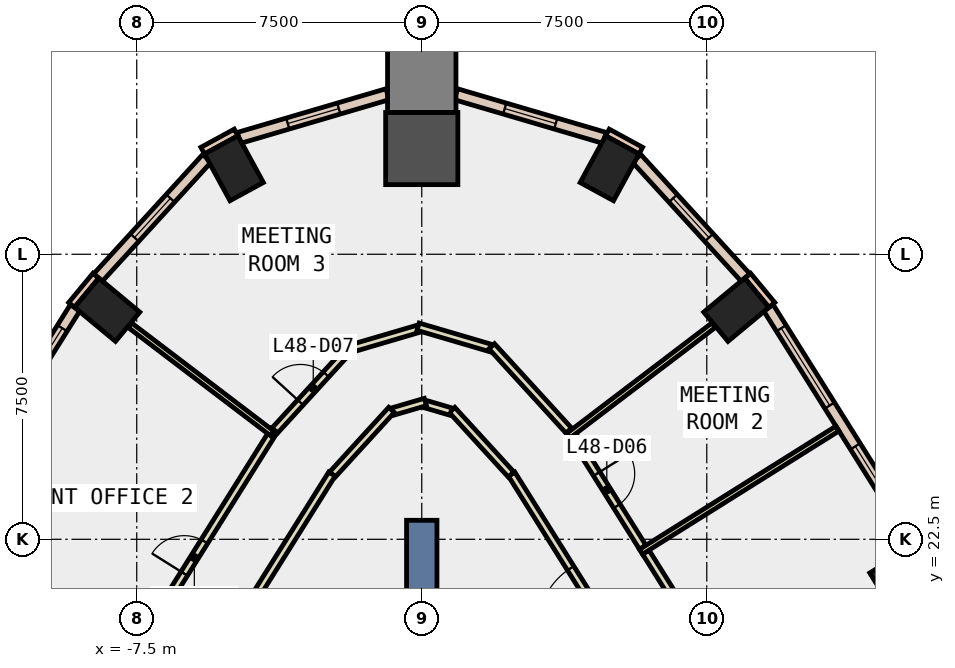
"""IFC4 building model, lengths in metres.
Left out: names, types, materials, properties, quantities, classifications, styles, units other than length and angle.
Written with IfcOpenShell. Run it as: python <this file> out.ifc"""

import sys

from ifc_helpers import new_model, si_unit, direction, frame, frame_2d, origin, origin_2d, place, context, subcontext, project, spatial, rectangle, extrude, element, fill, save


model = new_model("IFC4")
c1 = context("Model", 3, precision=1e-05, world=origin(), true_north=direction((0.0, 1.0)))
c2 = subcontext(c1, "Body", "Model", "MODEL_VIEW")
j1 = project(units=[si_unit("LENGTHUNIT", "METRE"), si_unit("PLANEANGLEUNIT", "RADIAN")], contexts=[c1])
p1 = place(None, origin())
s1 = spatial("IfcSite", under=j1, at=p1, CompositionType="ELEMENT")
p2 = place(p1, origin())
s2 = spatial("IfcBuilding", under=s1, at=p2, CompositionType="ELEMENT")
p3 = place(p2, frame((0.0, 0.0, 215.0)))
s3 = spatial("IfcBuildingStorey", under=s2, at=p3, CompositionType="ELEMENT", Elevation=215.0)
for number, where, z_axis, x_axis in (
    (1, (12.648, 21.557, -0.4), (0.0, 0.0, 1.0), (-0.525, 0.851, 0.0)),
    (2, (8.278, 28.54, -0.4), (0.0, 0.0, 1.0), (-0.639, 0.769, 0.0)),
    (3, (4.942, 32.263, -0.4), (0.0, 0.0, 1.0), (-0.878, 0.478, 0.0)),
):
    element("IfcColumn", number, at=place(p3, frame(where, z_axis=z_axis, x_axis=x_axis)), inside=s3, PredefinedType="COLUMN", context=c2, shape_type="SweptSolid", body=[
        extrude(rectangle(XDim=1.0, YDim=1.4, at=origin_2d()), origin(), (0.0, 0.0, 1.0), 4.2),
    ])
p4 = place(p3, frame((0.0, 32.782, -0.4), z_axis=(0.0, 0.0, 1.0), x_axis=(0.0, 1.0, 0.0)))
e4 = element("IfcColumn", 4, at=p4, inside=s3, PredefinedType="COLUMN", context=c2, shape_type="SweptSolid", body=[
    extrude(rectangle(XDim=1.9, YDim=1.9, at=origin_2d()), origin(), (0.0, 0.0, 1.0), 4.2),
])
for number, where, z_axis, x_axis in (
    (5, (-4.942, 32.263, -0.4), (0.0, 0.0, 1.0), (0.878, 0.478, 0.0)),
    (6, (-8.278, 28.54, -0.4), (0.0, 0.0, 1.0), (0.639, 0.769, 0.0)),
):
    element("IfcColumn", number, at=place(p3, frame(where, z_axis=z_axis, x_axis=x_axis)), inside=s3, PredefinedType="COLUMN", context=c2, shape_type="SweptSolid", body=[
        extrude(rectangle(XDim=1.0, YDim=1.4, at=origin_2d()), origin(), (0.0, 0.0, 1.0), 4.2),
    ])
p5 = place(p3, frame((0.0, 34.632, -0.4), z_axis=(0.0, 0.0, 1.0), x_axis=(0.0, 1.0, 0.0)))
e7 = element("IfcColumn", 7, at=p5, inside=s3, PredefinedType="COLUMN", context=c2, shape_type="SweptSolid", body=[
    extrude(rectangle(XDim=1.8, YDim=1.8, at=origin_2d()), origin(), (0.0, 0.0, 1.0), 4.2),
])
p6 = place(p3, frame((0.0, 14.0, -0.4), z_axis=(0.0, 0.0, 1.0), x_axis=(0.0, 1.0, 0.0)))
e8 = element("IfcWall", 8, at=p6, inside=s3, PredefinedType="SHEAR", context=c2, shape_type="SweptSolid", body=[
    extrude(rectangle(XDim=9.0, YDim=0.8, at=frame_2d((4.5, 0.0))), origin(), (0.0, 0.0, 1.0), 4.2),
])
for number, where, z_axis, x_axis in (
    (9, (5.764, 32.726, 0.0), (0.0, 0.0, 1.0), (-0.878, 0.478, 0.0)),
    (10, (-4.886, 33.204, 0.0), (0.0, 0.0, 1.0), (-0.878, -0.478, 0.0)),
):
    element("IfcWall", number, at=place(p3, frame(where, z_axis=z_axis, x_axis=x_axis)), inside=s3, PredefinedType="STANDARD", context=c2, shape_type="SweptSolid", body=[
        extrude(rectangle(XDim=1.0, YDim=0.2, at=frame_2d((0.5, 0.0))), origin(), (0.0, 0.0, 1.0), 3.8),
    ])
for number, where, z_axis, x_axis in (
    (11, (9.213, 28.666, 0.0), (0.0, 0.0, 1.0), (-0.638, 0.77, 0.0)),
    (12, (-8.575, 29.436, 0.0), (0.0, 0.0, 1.0), (-0.638, -0.77, 0.0)),
):
    element("IfcWall", number, at=place(p3, frame(where, z_axis=z_axis, x_axis=x_axis)), inside=s3, PredefinedType="STANDARD", context=c2, shape_type="SweptSolid", body=[
        extrude(rectangle(XDim=1.0, YDim=0.2, at=frame_2d((0.5, 0.0))), origin(), (0.0, 0.0, 1.0), 3.8),
    ])
p7 = place(p3, frame((13.021, 22.374, 0.0), z_axis=(0.0, 0.0, 1.0), x_axis=(-0.531239262679, 0.847221839773, 0.0)))
e13 = element("IfcWall", 13, at=p7, inside=s3, PredefinedType="STANDARD", context=c2, shape_type="SweptSolid", body=[
    extrude(rectangle(XDim=7.339, YDim=0.3, at=frame_2d((3.67, 0.0))), origin(), (0.0, 0.0, 1.0), 3.8),
])
p8 = place(p7, frame((0.635, 0.0, 0.9)))
e14 = element("IfcOpeningElement", 14, at=p8, cuts=e13, PredefinedType="OPENING", context=c2, shape_type="SweptSolid", body=[
    extrude(rectangle(XDim=2.4, YDim=2.6, at=frame_2d((1.2, 1.3))), frame((0.0, 0.16, 0.0), z_axis=(0.0, -1.0, 0.0), x_axis=(1.0, 0.0, 0.0)), (0.0, 0.0, 1.0), 0.32),
])
p9 = place(p7, frame((4.304, 0.0, 0.9)))
e15 = element("IfcOpeningElement", 15, at=p9, cuts=e13, PredefinedType="OPENING", context=c2, shape_type="SweptSolid", body=[
    extrude(rectangle(XDim=2.4, YDim=2.6, at=frame_2d((1.2, 1.3))), frame((0.0, 0.16, 0.0), z_axis=(0.0, -1.0, 0.0), x_axis=(1.0, 0.0, 0.0)), (0.0, 0.0, 1.0), 0.32),
])
p10 = place(p3, frame((8.518, 29.388, 0.0), z_axis=(0.0, 0.0, 1.0), x_axis=(-0.674487390017, 0.738286367684, 0.0)))
e16 = element("IfcWall", 16, at=p10, inside=s3, PredefinedType="STANDARD", context=c2, shape_type="SweptSolid", body=[
    extrude(rectangle(XDim=4.248, YDim=0.3, at=frame_2d((2.124, 0.0))), origin(), (0.0, 0.0, 1.0), 3.8),
])
p11 = place(p10, frame((1.424, 0.0, 0.9)))
e17 = element("IfcOpeningElement", 17, at=p11, cuts=e16, PredefinedType="OPENING", context=c2, shape_type="SweptSolid", body=[
    extrude(rectangle(XDim=1.4, YDim=2.6, at=frame_2d((0.7, 1.3))), frame((0.0, 0.16, 0.0), z_axis=(0.0, -1.0, 0.0), x_axis=(1.0, 0.0, 0.0)), (0.0, 0.0, 1.0), 0.32),
])
p12 = place(p3, frame((4.81, 33.062, 0.0), z_axis=(0.0, 0.0, 1.0), x_axis=(-0.959458909918, 0.281848541203, 0.0)))
e18 = element("IfcWall", 18, at=p12, inside=s3, PredefinedType="STANDARD", context=c2, shape_type="SweptSolid", body=[
    extrude(rectangle(XDim=4.076, YDim=0.3, at=frame_2d((2.038, 0.0))), origin(), (0.0, 0.0, 1.0), 3.8),
])
p13 = place(p12, frame((1.338, 0.0, 0.9)))
e19 = element("IfcOpeningElement", 19, at=p13, cuts=e18, PredefinedType="OPENING", context=c2, shape_type="SweptSolid", body=[
    extrude(rectangle(XDim=1.4, YDim=2.6, at=frame_2d((0.7, 1.3))), frame((0.0, 0.16, 0.0), z_axis=(0.0, -1.0, 0.0), x_axis=(1.0, 0.0, 0.0)), (0.0, 0.0, 1.0), 0.32),
])
p14 = place(p3, frame((-0.899, 34.211, 0.0), z_axis=(0.0, 0.0, 1.0), x_axis=(-0.959458909918, -0.281848541203, 0.0)))
e20 = element("IfcWall", 20, at=p14, inside=s3, PredefinedType="STANDARD", context=c2, shape_type="SweptSolid", body=[
    extrude(rectangle(XDim=4.076, YDim=0.3, at=frame_2d((2.038, 0.0))), origin(), (0.0, 0.0, 1.0), 3.8),
])
p15 = place(p14, frame((1.338, 0.0, 0.9)))
e21 = element("IfcOpeningElement", 21, at=p15, cuts=e20, PredefinedType="OPENING", context=c2, shape_type="SweptSolid", body=[
    extrude(rectangle(XDim=1.4, YDim=2.6, at=frame_2d((0.7, 1.3))), frame((0.0, 0.16, 0.0), z_axis=(0.0, -1.0, 0.0), x_axis=(1.0, 0.0, 0.0)), (0.0, 0.0, 1.0), 0.32),
])
p16 = place(p3, frame((-5.653, 32.524, 0.0), z_axis=(0.0, 0.0, 1.0), x_axis=(-0.674487390017, -0.738286367684, 0.0)))
e22 = element("IfcWall", 22, at=p16, inside=s3, PredefinedType="STANDARD", context=c2, shape_type="SweptSolid", body=[
    extrude(rectangle(XDim=4.248, YDim=0.3, at=frame_2d((2.124, 0.0))), origin(), (0.0, 0.0, 1.0), 3.8),
])
p17 = place(p16, frame((1.424, 0.0, 0.9)))
e23 = element("IfcOpeningElement", 23, at=p17, cuts=e22, PredefinedType="OPENING", context=c2, shape_type="SweptSolid", body=[
    extrude(rectangle(XDim=1.4, YDim=2.6, at=frame_2d((0.7, 1.3))), frame((0.0, 0.16, 0.0), z_axis=(0.0, -1.0, 0.0), x_axis=(1.0, 0.0, 0.0)), (0.0, 0.0, 1.0), 0.32),
])
p18 = place(p3, frame((-9.122, 28.592, 0.0), z_axis=(0.0, 0.0, 1.0), x_axis=(-0.531239262679, -0.847221839773, 0.0)))
e24 = element("IfcWall", 24, at=p18, inside=s3, PredefinedType="STANDARD", context=c2, shape_type="SweptSolid", body=[
    extrude(rectangle(XDim=7.339, YDim=0.3, at=frame_2d((3.67, 0.0))), origin(), (0.0, 0.0, 1.0), 3.8),
])
p19 = place(p18, frame((0.635, 0.0, 0.9)))
e25 = element("IfcOpeningElement", 25, at=p19, cuts=e24, PredefinedType="OPENING", context=c2, shape_type="SweptSolid", body=[
    extrude(rectangle(XDim=2.4, YDim=2.6, at=frame_2d((1.2, 1.3))), frame((0.0, 0.16, 0.0), z_axis=(0.0, -1.0, 0.0), x_axis=(1.0, 0.0, 0.0)), (0.0, 0.0, 1.0), 0.32),
])
p20 = place(p18, frame((4.304, 0.0, 0.9)))
e26 = element("IfcOpeningElement", 26, at=p20, cuts=e24, PredefinedType="OPENING", context=c2, shape_type="SweptSolid", body=[
    extrude(rectangle(XDim=2.4, YDim=2.6, at=frame_2d((1.2, 1.3))), frame((0.0, 0.16, 0.0), z_axis=(0.0, -1.0, 0.0), x_axis=(1.0, 0.0, 0.0)), (0.0, 0.0, 1.0), 0.32),
])
p21 = place(p3, frame((6.427, 17.738, 0.0), z_axis=(0.0, 0.0, 1.0), x_axis=(-0.531335643981, 0.847161397512, 0.0)))
e27 = element("IfcWall", 27, at=p21, inside=s3, PredefinedType="PARTITIONING", context=c2, shape_type="SweptSolid", body=[
    extrude(rectangle(XDim=7.647, YDim=0.2, at=frame_2d((3.823, 0.0))), origin(), (0.0, 0.0, 1.0), 3.8),
])
p22 = place(p21, frame((2.923, 0.0, 0.0)))
e28 = element("IfcOpeningElement", 28, at=p22, cuts=e27, PredefinedType="OPENING", context=c2, shape_type="SweptSolid", body=[
    extrude(rectangle(XDim=1.8, YDim=2.1, at=frame_2d((0.9, 1.05))), frame((0.0, 0.11, 0.0), z_axis=(0.0, -1.0, 0.0), x_axis=(1.0, 0.0, 0.0)), (0.0, 0.0, 1.0), 0.22),
])
p23 = place(p3, frame((2.35, 24.205, 0.0), z_axis=(0.0, 0.0, 1.0), x_axis=(-0.67475930229, 0.738037860799, 0.0)))
e29 = element("IfcWall", 29, at=p23, inside=s3, PredefinedType="PARTITIONING", context=c2, shape_type="SweptSolid", body=[
    extrude(rectangle(XDim=2.303, YDim=0.2, at=frame_2d((1.152, 0.0))), origin(), (0.0, 0.0, 1.0), 3.8),
])
p24 = place(p3, frame((0.768, 25.86, 0.0), z_axis=(0.0, 0.0, 1.0), x_axis=(-0.959714481723, 0.280977069476, 0.0)))
e30 = element("IfcWall", 30, at=p24, inside=s3, PredefinedType="PARTITIONING", context=c2, shape_type="SweptSolid", body=[
    extrude(rectangle(XDim=0.7, YDim=0.2, at=frame_2d((0.35, 0.0))), origin(), (0.0, 0.0, 1.0), 3.8),
])
p25 = place(p3, frame((0.096, 26.113, 0.0), z_axis=(0.0, 0.0, 1.0), x_axis=(-0.959723140705, -0.280947491882, 0.0)))
e31 = element("IfcWall", 31, at=p25, inside=s3, PredefinedType="PARTITIONING", context=c2, shape_type="SweptSolid", body=[
    extrude(rectangle(XDim=0.9, YDim=0.2, at=frame_2d((0.45, 0.0))), origin(), (0.0, 0.0, 1.0), 3.8),
])
p26 = place(p3, frame((-0.796, 25.905, 0.0), z_axis=(0.0, 0.0, 1.0), x_axis=(-0.67475930229, -0.738037860799, 0.0)))
e32 = element("IfcWall", 32, at=p26, inside=s3, PredefinedType="PARTITIONING", context=c2, shape_type="SweptSolid", body=[
    extrude(rectangle(XDim=2.303, YDim=0.2, at=frame_2d((1.152, 0.0))), origin(), (0.0, 0.0, 1.0), 3.8),
])
p27 = place(p3, frame((-2.364, 24.216, 0.0), z_axis=(0.0, 0.0, 1.0), x_axis=(-0.531335643981, -0.847161397512, 0.0)))
e33 = element("IfcWall", 33, at=p27, inside=s3, PredefinedType="PARTITIONING", context=c2, shape_type="SweptSolid", body=[
    extrude(rectangle(XDim=7.647, YDim=0.2, at=frame_2d((3.823, 0.0))), origin(), (0.0, 0.0, 1.0), 3.8),
])
p28 = place(p3, frame((5.895, 22.162, 0.0), z_axis=(0.0, 0.0, 1.0), x_axis=(0.531245023709, -0.847218227368, 0.0)))
e34 = element("IfcWall", 34, at=p28, inside=s3, PredefinedType="PARTITIONING", context=c2, shape_type="SweptSolid", body=[
    extrude(rectangle(XDim=4.049, YDim=0.2, at=frame_2d((2.024, 0.0))), origin(), (0.0, 0.0, 1.0), 3.8),
])
p29 = place(p3, frame((3.923, 25.307, 0.0), z_axis=(0.0, 0.0, 1.0), x_axis=(0.531150612982, -0.847277419934, 0.0)))
e35 = element("IfcWall", 35, at=p29, inside=s3, PredefinedType="PARTITIONING", context=c2, shape_type="SweptSolid", body=[
    extrude(rectangle(XDim=3.562, YDim=0.2, at=frame_2d((1.781, 0.0))), origin(), (0.0, 0.0, 1.0), 3.8),
])
p30 = place(p29, frame((1.281, 0.0, 0.0)))
e36 = element("IfcOpeningElement", 36, at=p30, cuts=e35, PredefinedType="OPENING", context=c2, shape_type="SweptSolid", body=[
    extrude(rectangle(XDim=1.0, YDim=2.1, at=frame_2d((0.5, 1.05))), frame((0.0, 0.11, 0.0), z_axis=(0.0, -1.0, 0.0), x_axis=(1.0, 0.0, 0.0)), (0.0, 0.0, 1.0), 0.22),
])
p31 = place(p3, frame((-3.869, 25.36, 0.0), z_axis=(0.0, 0.0, 1.0), x_axis=(0.674594755709, 0.738188265668, 0.0)))
e37 = element("IfcWall", 37, at=p31, inside=s3, PredefinedType="PARTITIONING", context=c2, shape_type="SweptSolid", body=[
    extrude(rectangle(XDim=3.006, YDim=0.2, at=frame_2d((1.503, 0.0))), origin(), (0.0, 0.0, 1.0), 3.8),
])
p32 = place(p31, frame((1.003, 0.0, 0.0)))
e38 = element("IfcOpeningElement", 38, at=p32, cuts=e37, PredefinedType="OPENING", context=c2, shape_type="SweptSolid", body=[
    extrude(rectangle(XDim=1.0, YDim=2.1, at=frame_2d((0.5, 1.05))), frame((0.0, 0.11, 0.0), z_axis=(0.0, -1.0, 0.0), x_axis=(1.0, 0.0, 0.0)), (0.0, 0.0, 1.0), 0.22),
])
p33 = place(p3, frame((-1.813, 27.533, 0.0), z_axis=(0.0, 0.0, 1.0), x_axis=(0.959495744111, 0.281723121227, 0.0)))
e39 = element("IfcWall", 39, at=p33, inside=s3, PredefinedType="PARTITIONING", context=c2, shape_type="SweptSolid", body=[
    extrude(rectangle(XDim=1.79, YDim=0.2, at=frame_2d((0.895, 0.0))), origin(), (0.0, 0.0, 1.0), 3.8),
])
p34 = place(p3, frame((-0.096, 28.094, 0.0), z_axis=(0.0, 0.0, 1.0), x_axis=(0.959422144877, -0.281973665293, 0.0)))
e40 = element("IfcWall", 40, at=p34, inside=s3, PredefinedType="PARTITIONING", context=c2, shape_type="SweptSolid", body=[
    extrude(rectangle(XDim=1.99, YDim=0.2, at=frame_2d((0.995, 0.0))), origin(), (0.0, 0.0, 1.0), 3.8),
])
p35 = place(p3, frame((1.841, 27.579, 0.0), z_axis=(0.0, 0.0, 1.0), x_axis=(0.674594755709, -0.738188265668, 0.0)))
e41 = element("IfcWall", 41, at=p35, inside=s3, PredefinedType="PARTITIONING", context=c2, shape_type="SweptSolid", body=[
    extrude(rectangle(XDim=3.006, YDim=0.2, at=frame_2d((1.503, 0.0))), origin(), (0.0, 0.0, 1.0), 3.8),
])
p36 = place(p3, frame((-8.086, 18.669, 0.0), z_axis=(0.0, 0.0, 1.0), x_axis=(0.531329962263, 0.847164961033, 0.0)))
e42 = element("IfcWall", 42, at=p36, inside=s3, PredefinedType="PARTITIONING", context=c2, shape_type="SweptSolid", body=[
    extrude(rectangle(XDim=7.91, YDim=0.2, at=frame_2d((3.955, 0.0))), origin(), (0.0, 0.0, 1.0), 3.8),
])
p37 = place(p36, frame((3.455, 0.0, 0.0)))
e43 = element("IfcOpeningElement", 43, at=p37, cuts=e42, PredefinedType="OPENING", context=c2, shape_type="SweptSolid", body=[
    extrude(rectangle(XDim=1.0, YDim=2.1, at=frame_2d((0.5, 1.05))), frame((0.0, 0.11, 0.0), z_axis=(0.0, -1.0, 0.0), x_axis=(1.0, 0.0, 0.0)), (0.0, 0.0, 1.0), 0.22),
])
p38 = place(p3, frame((5.77, 22.172, 0.0), z_axis=(0.0, 0.0, 1.0), x_axis=(0.847187879248, 0.531293419171, 0.0)))
e44 = element("IfcWall", 44, at=p38, inside=s3, PredefinedType="PARTITIONING", context=c2, shape_type="SweptSolid", body=[
    extrude(rectangle(XDim=6.1, YDim=0.15, at=frame_2d((3.05, 0.0))), origin(), (0.0, 0.0, 1.0), 3.8),
])
p39 = place(p3, frame((3.856, 25.225, 0.0), z_axis=(0.0, 0.0, 1.0), x_axis=(0.795987848728, 0.605312600792, 0.0)))
e45 = element("IfcWall", 45, at=p39, inside=s3, PredefinedType="PARTITIONING", context=c2, shape_type="SweptSolid", body=[
    extrude(rectangle(XDim=4.804, YDim=0.15, at=frame_2d((2.402, 0.0))), origin(), (0.0, 0.0, 1.0), 3.8),
])
p40 = place(p3, frame((-3.936, 25.286, 0.0), z_axis=(0.0, 0.0, 1.0), x_axis=(-0.795977117067, 0.605326712698, 0.0)))
e46 = element("IfcWall", 46, at=p40, inside=s3, PredefinedType="PARTITIONING", context=c2, shape_type="SweptSolid", body=[
    extrude(rectangle(XDim=4.704, YDim=0.15, at=frame_2d((2.352, 0.0))), origin(), (0.0, 0.0, 1.0), 3.8),
])
p41 = place(p3, frame((-8.131, 18.784, 0.0), z_axis=(0.0, 0.0, 1.0), x_axis=(-0.851969320918, 0.52359170755, 0.0)))
e47 = element("IfcWall", 47, at=p41, inside=s3, PredefinedType="PARTITIONING", context=c2, shape_type="SweptSolid", body=[
    extrude(rectangle(XDim=4.58, YDim=0.15, at=frame_2d((2.29, 0.0))), origin(), (0.0, 0.0, 1.0), 3.8),
])
p42 = place(p8, origin())
e48 = element("IfcWindow", 48, at=p42, inside=s3, PartitioningType="SINGLE_PANEL", PredefinedType="WINDOW", context=c2, shape_type="SweptSolid", body=[
    extrude(rectangle(XDim=2.4, YDim=2.6, at=frame_2d((1.2, 1.3))), frame((0.0, 0.03, 0.0), z_axis=(0.0, -1.0, 0.0), x_axis=(1.0, 0.0, 0.0)), (0.0, 0.0, 1.0), 0.06),
])
fill(e14, e48)
p43 = place(p9, origin())
e49 = element("IfcWindow", 49, at=p43, inside=s3, PartitioningType="SINGLE_PANEL", PredefinedType="WINDOW", context=c2, shape_type="SweptSolid", body=[
    extrude(rectangle(XDim=2.4, YDim=2.6, at=frame_2d((1.2, 1.3))), frame((0.0, 0.03, 0.0), z_axis=(0.0, -1.0, 0.0), x_axis=(1.0, 0.0, 0.0)), (0.0, 0.0, 1.0), 0.06),
])
fill(e15, e49)
p44 = place(p11, origin())
e50 = element("IfcWindow", 50, at=p44, inside=s3, PartitioningType="SINGLE_PANEL", PredefinedType="WINDOW", context=c2, shape_type="SweptSolid", body=[
    extrude(rectangle(XDim=1.4, YDim=2.6, at=frame_2d((0.7, 1.3))), frame((0.0, 0.03, 0.0), z_axis=(0.0, -1.0, 0.0), x_axis=(1.0, 0.0, 0.0)), (0.0, 0.0, 1.0), 0.06),
])
fill(e17, e50)
p45 = place(p13, origin())
e51 = element("IfcWindow", 51, at=p45, inside=s3, PartitioningType="SINGLE_PANEL", PredefinedType="WINDOW", context=c2, shape_type="SweptSolid", body=[
    extrude(rectangle(XDim=1.4, YDim=2.6, at=frame_2d((0.7, 1.3))), frame((0.0, 0.03, 0.0), z_axis=(0.0, -1.0, 0.0), x_axis=(1.0, 0.0, 0.0)), (0.0, 0.0, 1.0), 0.06),
])
fill(e19, e51)
p46 = place(p15, origin())
e52 = element("IfcWindow", 52, at=p46, inside=s3, PartitioningType="SINGLE_PANEL", PredefinedType="WINDOW", context=c2, shape_type="SweptSolid", body=[
    extrude(rectangle(XDim=1.4, YDim=2.6, at=frame_2d((0.7, 1.3))), frame((0.0, 0.03, 0.0), z_axis=(0.0, -1.0, 0.0), x_axis=(1.0, 0.0, 0.0)), (0.0, 0.0, 1.0), 0.06),
])
fill(e21, e52)
p47 = place(p17, origin())
e53 = element("IfcWindow", 53, at=p47, inside=s3, PartitioningType="SINGLE_PANEL", PredefinedType="WINDOW", context=c2, shape_type="SweptSolid", body=[
    extrude(rectangle(XDim=1.4, YDim=2.6, at=frame_2d((0.7, 1.3))), frame((0.0, 0.03, 0.0), z_axis=(0.0, -1.0, 0.0), x_axis=(1.0, 0.0, 0.0)), (0.0, 0.0, 1.0), 0.06),
])
fill(e23, e53)
p48 = place(p19, origin())
e54 = element("IfcWindow", 54, at=p48, inside=s3, PartitioningType="SINGLE_PANEL", PredefinedType="WINDOW", context=c2, shape_type="SweptSolid", body=[
    extrude(rectangle(XDim=2.4, YDim=2.6, at=frame_2d((1.2, 1.3))), frame((0.0, 0.03, 0.0), z_axis=(0.0, -1.0, 0.0), x_axis=(1.0, 0.0, 0.0)), (0.0, 0.0, 1.0), 0.06),
])
fill(e25, e54)
p49 = place(p30, origin())
e55 = element("IfcDoor", 55, at=p49, inside=s3, OperationType="SINGLE_SWING_LEFT", PredefinedType="DOOR", context=c2, shape_type="SweptSolid", body=[
    extrude(rectangle(XDim=1.0, YDim=2.1, at=frame_2d((0.5, 1.05))), frame((0.0, 0.025, 0.0), z_axis=(0.0, -1.0, 0.0), x_axis=(1.0, 0.0, 0.0)), (0.0, 0.0, 1.0), 0.05),
])
fill(e36, e55)
p50 = place(p32, origin())
e56 = element("IfcDoor", 56, at=p50, inside=s3, OperationType="SINGLE_SWING_LEFT", PredefinedType="DOOR", context=c2, shape_type="SweptSolid", body=[
    extrude(rectangle(XDim=1.0, YDim=2.1, at=frame_2d((0.5, 1.05))), frame((0.0, 0.025, 0.0), z_axis=(0.0, -1.0, 0.0), x_axis=(1.0, 0.0, 0.0)), (0.0, 0.0, 1.0), 0.05),
])
fill(e38, e56)
p51 = place(p37, origin())
e57 = element("IfcDoor", 57, at=p51, inside=s3, OperationType="SINGLE_SWING_RIGHT", PredefinedType="DOOR", context=c2, shape_type="SweptSolid", body=[
    extrude(rectangle(XDim=1.0, YDim=2.1, at=frame_2d((0.5, 1.05))), frame((0.0, 0.025, 0.0), z_axis=(0.0, -1.0, 0.0), x_axis=(1.0, 0.0, 0.0)), (0.0, 0.0, 1.0), 0.05),
])
fill(e43, e57)
p52 = place(p22, origin())
e58 = element("IfcDoor", 58, at=p52, inside=s3, OperationType="DOUBLE_DOOR_SINGLE_SWING", PredefinedType="DOOR", context=c2, shape_type="SweptSolid", body=[
    extrude(rectangle(XDim=1.8, YDim=2.1, at=frame_2d((0.9, 1.05))), frame((0.0, 0.025, 0.0), z_axis=(0.0, -1.0, 0.0), x_axis=(1.0, 0.0, 0.0)), (0.0, 0.0, 1.0), 0.05),
])
fill(e28, e58)
save(model, sys.argv[1])
